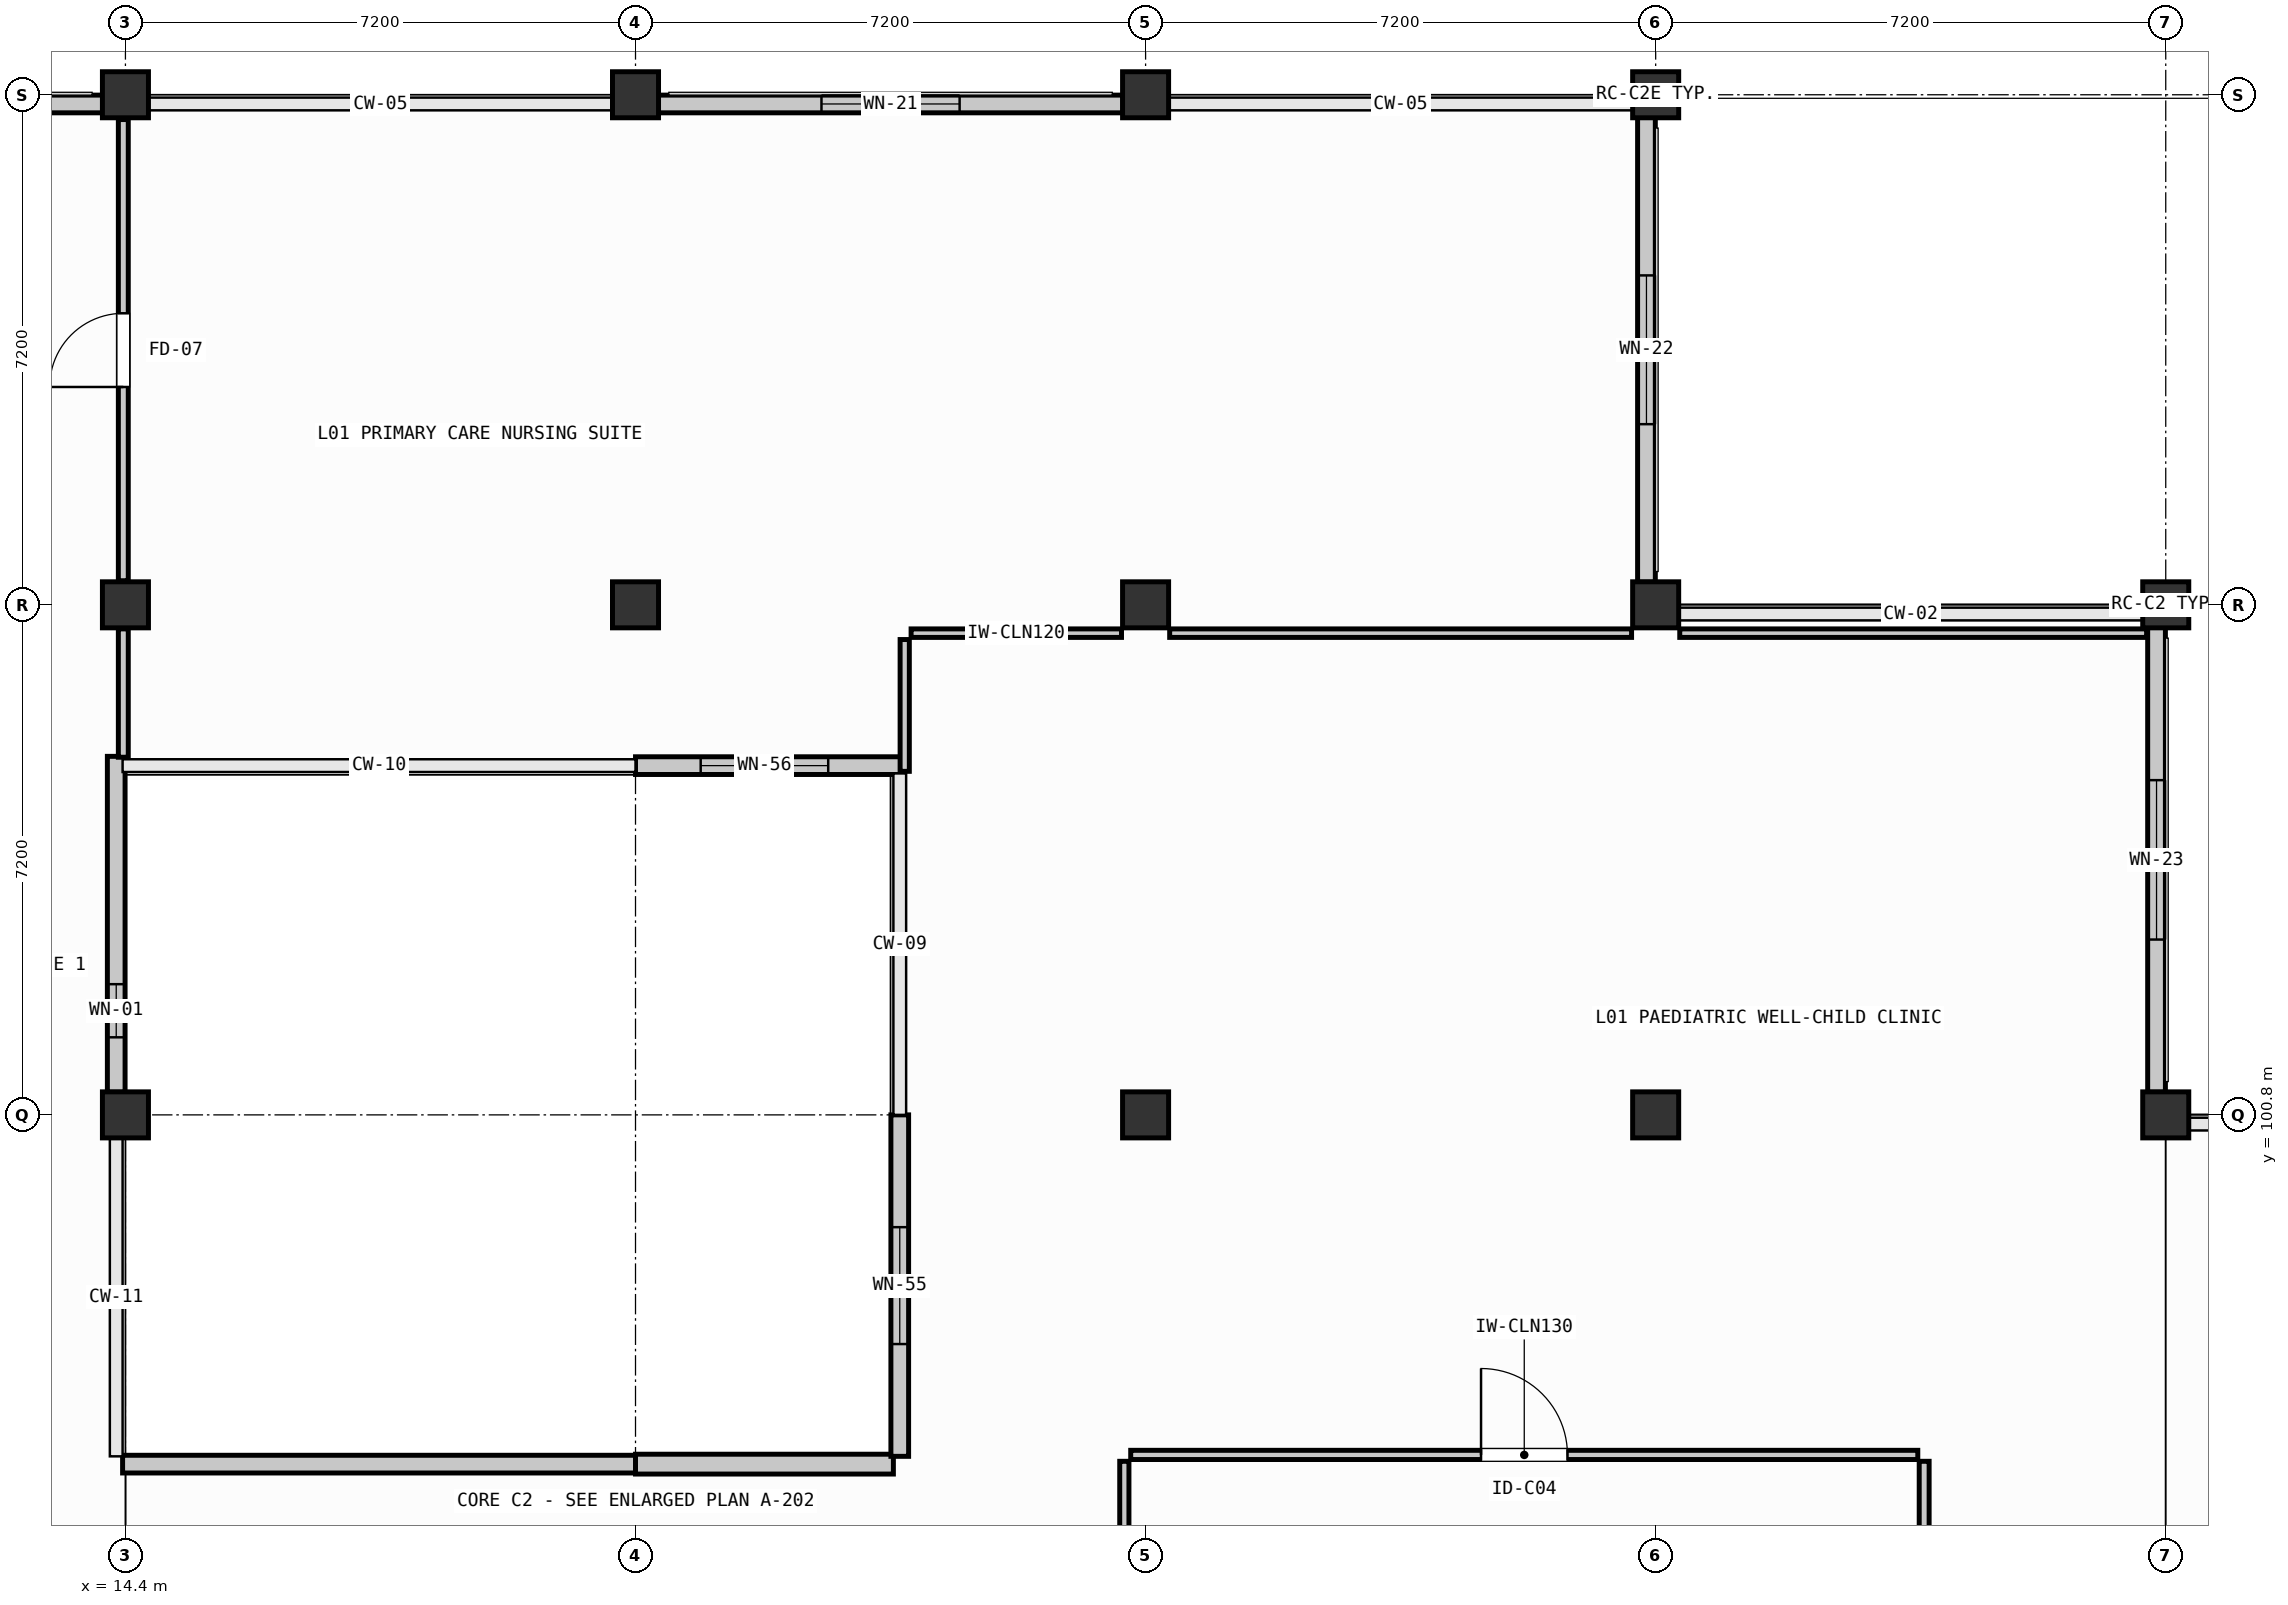
"""IFC4 building model, lengths in metres.
Left out: names, types, materials, properties, quantities, classifications, styles, units other than length and angle.
Written with IfcOpenShell. Run it as: python <this file> out.ifc"""

import sys

from ifc_helpers import new_model, si_unit, direction, frame, frame_2d, origin, origin_2d, place, context, subcontext, project, spatial, rectangle, extrude, element, fill, save


model = new_model("IFC4")
c1 = context("Model", 3, precision=1e-05, world=origin(), true_north=direction((0.0, 1.0)))
c2 = subcontext(c1, "Body", "Model", "MODEL_VIEW")
j1 = project(units=[si_unit("LENGTHUNIT", "METRE"), si_unit("PLANEANGLEUNIT", "RADIAN")], contexts=[c1])
p1 = place(None, origin())
s1 = spatial("IfcSite", under=j1, at=p1, CompositionType="ELEMENT")
p2 = place(p1, origin())
s2 = spatial("IfcBuilding", under=s1, at=p2, CompositionType="ELEMENT")
p3 = place(p2, origin())
s3 = spatial("IfcBuildingStorey", under=s2, at=p3, CompositionType="ELEMENT", Elevation=0.0)
for number, where, z_axis, x_axis in (
    (1, (14.4, 100.8, 0.0), (0.0, 0.0, 1.0), (1.0, 0.0, 0.0)),
    (2, (14.4, 108.0, 0.0), (0.0, 0.0, 1.0), (1.0, 0.0, 0.0)),
    (3, (14.4, 115.2, 0.0), (0.0, 0.0, 1.0), (1.0, 0.0, 0.0)),
    (4, (21.6, 108.0, 0.0), (0.0, 0.0, 1.0), (1.0, 0.0, 0.0)),
    (5, (21.6, 115.2, 0.0), (0.0, 0.0, 1.0), (1.0, 0.0, 0.0)),
    (6, (28.8, 100.8, 0.0), (0.0, 0.0, 1.0), (1.0, 0.0, 0.0)),
    (7, (28.8, 108.0, 0.0), (0.0, 0.0, 1.0), (1.0, 0.0, 0.0)),
    (8, (28.8, 115.2, 0.0), (0.0, 0.0, 1.0), (1.0, 0.0, 0.0)),
):
    element("IfcColumn", number, at=place(p3, frame(where, z_axis=z_axis, x_axis=x_axis)), inside=s3, PredefinedType="COLUMN", context=c2, shape_type="SweptSolid", body=[
        extrude(rectangle(XDim=0.65, YDim=0.65, at=origin_2d()), origin(), (0.0, 0.0, 1.0), 4.56),
    ])
for number, where, z_axis, x_axis in (
    (9, (36.0, 100.8, -0.25), (0.0, 0.0, 1.0), (1.0, 0.0, 0.0)),
    (10, (36.0, 108.0, -0.25), (0.0, 0.0, 1.0), (1.0, 0.0, 0.0)),
    (11, (36.0, 115.2, -0.25), (0.0, 0.0, 1.0), (1.0, 0.0, 0.0)),
    (12, (43.2, 100.8, -0.25), (0.0, 0.0, 1.0), (1.0, 0.0, 0.0)),
    (13, (43.2, 108.0, -0.25), (0.0, 0.0, 1.0), (1.0, 0.0, 0.0)),
):
    element("IfcColumn", number, at=place(p3, frame(where, z_axis=z_axis, x_axis=x_axis)), inside=s3, PredefinedType="COLUMN", context=c2, shape_type="SweptSolid", body=[
        extrude(rectangle(XDim=0.65, YDim=0.65, at=origin_2d()), origin(), (0.0, 0.0, 1.0), 4.81),
    ])
p4 = place(p3, frame((7.52, 115.07, 0.0), z_axis=(0.0, 0.0, 1.0), x_axis=(1.0, 0.0, 0.0)))
e14 = element("IfcWall", 14, at=p4, inside=s3, PredefinedType="SOLIDWALL", context=c2, shape_type="SweptSolid", body=[
    extrude(rectangle(XDim=6.56, YDim=0.25, at=frame_2d((3.28, 0.0))), origin(), (0.0, 0.0, 1.0), 3.86),
])
p5 = place(p4, frame((2.38, 0.0, 1.5)))
e15 = element("IfcOpeningElement", 15, at=p5, cuts=e14, PredefinedType="OPENING", context=c2, shape_type="SweptSolid", body=[
    extrude(rectangle(XDim=1.8, YDim=0.95, at=frame_2d((0.9, 0.475))), frame((0.0, 0.135, 0.0), z_axis=(0.0, -1.0, 0.0), x_axis=(1.0, 0.0, 0.0)), (0.0, 0.0, 1.0), 0.27),
])
p6 = place(p3, frame((21.92, 115.07, 0.0), z_axis=(0.0, 0.0, 1.0), x_axis=(1.0, 0.0, 0.0)))
e16 = element("IfcWall", 16, at=p6, inside=s3, PredefinedType="SOLIDWALL", context=c2, shape_type="SweptSolid", body=[
    extrude(rectangle(XDim=6.56, YDim=0.25, at=frame_2d((3.28, 0.0))), origin(), (0.0, 0.0, 1.0), 3.86),
])
p7 = place(p6, frame((2.305, 0.0, 1.5)))
e17 = element("IfcOpeningElement", 17, at=p7, cuts=e16, PredefinedType="OPENING", context=c2, shape_type="SweptSolid", body=[
    extrude(rectangle(XDim=1.95, YDim=0.95, at=frame_2d((0.975, 0.475))), frame((0.0, 0.135, 0.0), z_axis=(0.0, -1.0, 0.0), x_axis=(1.0, 0.0, 0.0)), (0.0, 0.0, 1.0), 0.27),
])
p8 = place(p3, frame((35.87, 114.88, 0.0), z_axis=(0.0, 0.0, 1.0), x_axis=(0.0, -1.0, 0.0)))
e18 = element("IfcWall", 18, at=p8, inside=s3, PredefinedType="SOLIDWALL", context=c2, shape_type="SweptSolid", body=[
    extrude(rectangle(XDim=6.56, YDim=0.25, at=frame_2d((3.28, 0.0))), origin(), (0.0, 0.0, 1.0), 3.76),
])
p9 = place(p8, frame((2.23, 0.0, 1.5)))
e19 = element("IfcOpeningElement", 19, at=p9, cuts=e18, PredefinedType="OPENING", context=c2, shape_type="SweptSolid", body=[
    extrude(rectangle(XDim=2.1, YDim=0.95, at=frame_2d((1.05, 0.475))), frame((0.0, 0.135, 0.0), z_axis=(0.0, -1.0, 0.0), x_axis=(1.0, 0.0, 0.0)), (0.0, 0.0, 1.0), 0.27),
])
p10 = place(p3, frame((43.07, 107.68, 0.0), z_axis=(0.0, 0.0, 1.0), x_axis=(0.0, -1.0, 0.0)))
e20 = element("IfcWall", 20, at=p10, inside=s3, PredefinedType="SOLIDWALL", context=c2, shape_type="SweptSolid", body=[
    extrude(rectangle(XDim=6.56, YDim=0.25, at=frame_2d((3.28, 0.0))), origin(), (0.0, 0.0, 1.0), 3.76),
])
p11 = place(p10, frame((2.155, 0.0, 1.5)))
e21 = element("IfcOpeningElement", 21, at=p11, cuts=e20, PredefinedType="OPENING", context=c2, shape_type="SweptSolid", body=[
    extrude(rectangle(XDim=2.25, YDim=0.95, at=frame_2d((1.125, 0.475))), frame((0.0, 0.135, 0.0), z_axis=(0.0, -1.0, 0.0), x_axis=(1.0, 0.0, 0.0)), (0.0, 0.0, 1.0), 0.27),
])
p12 = place(p3, frame((14.36, 95.87, 0.0), z_axis=(0.0, 0.0, 1.0), x_axis=(1.0, 0.0, 0.0)))
e22 = element("IfcWall", 22, at=p12, inside=s3, PredefinedType="SOLIDWALL", context=c2, shape_type="SweptSolid", body=[
    extrude(rectangle(XDim=7.24, YDim=0.25, at=frame_2d((3.62, 0.0))), origin(), (0.0, 0.0, 1.0), 3.86),
])
p13 = place(p3, frame((21.6, 95.87, 0.0), z_axis=(0.0, 0.0, 1.0), x_axis=(1.0, 0.0, 0.0)))
e23 = element("IfcWall", 23, at=p13, inside=s3, PredefinedType="SOLIDWALL", context=c2, shape_type="SweptSolid", body=[
    extrude(rectangle(XDim=3.64, YDim=0.28, at=frame_2d((1.82, 0.0))), origin(), (0.0, 0.0, 1.0), 4.57),
])
p14 = place(p3, frame((25.33, 95.98, 0.0), z_axis=(0.0, 0.0, 1.0), x_axis=(0.0, 1.0, 0.0)))
e24 = element("IfcWall", 24, at=p14, inside=s3, PredefinedType="SOLIDWALL", context=c2, shape_type="SweptSolid", body=[
    extrude(rectangle(XDim=4.82, YDim=0.25, at=frame_2d((2.41, 0.0))), origin(), (0.0, 0.0, 1.0), 4.57),
])
p15 = place(p14, frame((1.585, 0.0, 0.95)))
e25 = element("IfcOpeningElement", 25, at=p15, cuts=e24, PredefinedType="OPENING", context=c2, shape_type="SweptSolid", body=[
    extrude(rectangle(XDim=1.65, YDim=1.85, at=frame_2d((0.825, 0.925))), frame((0.0, 0.135, 0.0), z_axis=(0.0, -1.0, 0.0), x_axis=(1.0, 0.0, 0.0)), (0.0, 0.0, 1.0), 0.27),
])
p16 = place(p3, frame((25.351, 105.73, 0.0), z_axis=(0.0, 0.0, 1.0), x_axis=(-1.0, 0.0, 0.0)))
e26 = element("IfcWall", 26, at=p16, inside=s3, PredefinedType="SOLIDWALL", context=c2, shape_type="SweptSolid", body=[
    extrude(rectangle(XDim=3.751, YDim=0.25, at=frame_2d((1.875, 0.0))), origin(), (0.0, 0.0, 1.0), 4.57),
])
p17 = place(p16, frame((1.031, 0.0, 0.95)))
e27 = element("IfcOpeningElement", 27, at=p17, cuts=e26, PredefinedType="OPENING", context=c2, shape_type="SweptSolid", body=[
    extrude(rectangle(XDim=1.8, YDim=1.85, at=frame_2d((0.9, 0.925))), frame((0.0, 0.135, 0.0), z_axis=(0.0, -1.0, 0.0), x_axis=(1.0, 0.0, 0.0)), (0.0, 0.0, 1.0), 0.27),
])
p18 = place(p3, frame((14.27, 105.861, 0.0), z_axis=(0.0, 0.0, 1.0), x_axis=(0.0, -1.0, 0.0)))
e28 = element("IfcWall", 28, at=p18, inside=s3, PredefinedType="SOLIDWALL", context=c2, shape_type="SweptSolid", body=[
    extrude(rectangle(XDim=4.741, YDim=0.25, at=frame_2d((2.371, 0.0))), origin(), (0.0, 0.0, 1.0), 3.76),
])
p19 = place(p18, frame((3.216, 0.0, 2.1)))
e29 = element("IfcOpeningElement", 29, at=p19, cuts=e28, PredefinedType="OPENING", context=c2, shape_type="SweptSolid", body=[
    extrude(rectangle(XDim=0.75, YDim=0.65, at=frame_2d((0.375, 0.325))), frame((0.0, 0.135, 0.0), z_axis=(0.0, -1.0, 0.0), x_axis=(1.0, 0.0, 0.0)), (0.0, 0.0, 1.0), 0.27),
])
p20 = place(p3, frame((28.59, 96.0, 0.0), z_axis=(0.0, 0.0, 1.0), x_axis=(1.0, 0.0, 0.0)))
e30 = element("IfcWall", 30, at=p20, inside=s3, PredefinedType="PARTITIONING", context=c2, shape_type="SweptSolid", body=[
    extrude(rectangle(XDim=11.11, YDim=0.13, at=frame_2d((5.555, 0.0))), origin(), (0.0, 0.0, 1.0), 3.86),
])
p21 = place(p20, frame((4.945, 0.0, 0.0)))
e31 = element("IfcOpeningElement", 31, at=p21, cuts=e30, PredefinedType="OPENING", context=c2, shape_type="SweptSolid", body=[
    extrude(rectangle(XDim=1.22, YDim=2.18, at=frame_2d((0.61, 1.09))), frame((0.0, 0.075, 0.0), z_axis=(0.0, -1.0, 0.0), x_axis=(1.0, 0.0, 0.0)), (0.0, 0.0, 1.0), 0.15),
])
p22 = place(p3, frame((39.79, 95.91, 0.0), z_axis=(0.0, 0.0, 1.0), x_axis=(0.0, -1.0, 0.0)))
e32 = element("IfcWall", 32, at=p22, inside=s3, PredefinedType="PARTITIONING", context=c2, shape_type="SweptSolid", body=[
    extrude(rectangle(XDim=9.28, YDim=0.14, at=frame_2d((4.64, 0.0))), origin(), (0.0, 0.0, 1.0), 3.76),
])
p23 = place(p22, frame((4.08, 0.0, 0.0)))
e33 = element("IfcOpeningElement", 33, at=p23, cuts=e32, PredefinedType="OPENING", context=c2, shape_type="SweptSolid", body=[
    extrude(rectangle(XDim=1.12, YDim=2.14, at=frame_2d((0.56, 1.07))), frame((0.0, 0.08, 0.0), z_axis=(0.0, -1.0, 0.0), x_axis=(1.0, 0.0, 0.0)), (0.0, 0.0, 1.0), 0.16),
])
p24 = place(p3, frame((28.5, 93.94, 0.0), z_axis=(0.0, 0.0, 1.0), x_axis=(0.0, 1.0, 0.0)))
e34 = element("IfcWall", 34, at=p24, inside=s3, PredefinedType="PARTITIONING", context=c2, shape_type="SweptSolid", body=[
    extrude(rectangle(XDim=1.97, YDim=0.13, at=frame_2d((0.985, 0.0))), origin(), (0.0, 0.0, 1.0), 3.86),
])
p25 = place(p3, frame((25.4, 105.649, 0.0), z_axis=(0.0, 0.0, 1.0), x_axis=(0.0, 1.0, 0.0)))
e35 = element("IfcWall", 35, at=p25, inside=s3, PredefinedType="PARTITIONING", context=c2, shape_type="SweptSolid", body=[
    extrude(rectangle(XDim=1.861, YDim=0.13, at=frame_2d((0.93, 0.0))), origin(), (0.0, 0.0, 1.0), 4.57),
])
p26 = place(p3, frame((25.49, 107.6, 0.0), z_axis=(0.0, 0.0, 1.0), x_axis=(1.0, 0.0, 0.0)))
e36 = element("IfcWall", 36, at=p26, inside=s3, PredefinedType="PARTITIONING", context=c2, shape_type="SweptSolid", body=[
    extrude(rectangle(XDim=2.97, YDim=0.12, at=frame_2d((1.485, 0.0))), origin(), (0.0, 0.0, 1.0), 3.76),
])
p27 = place(p3, frame((29.14, 107.6, 0.0), z_axis=(0.0, 0.0, 1.0), x_axis=(1.0, 0.0, 0.0)))
e37 = element("IfcWall", 37, at=p27, inside=s3, PredefinedType="PARTITIONING", context=c2, shape_type="SweptSolid", body=[
    extrude(rectangle(XDim=6.52, YDim=0.12, at=frame_2d((3.26, 0.0))), origin(), (0.0, 0.0, 1.0), 3.76),
])
p28 = place(p3, frame((36.34, 107.6, 0.0), z_axis=(0.0, 0.0, 1.0), x_axis=(1.0, 0.0, 0.0)))
e38 = element("IfcWall", 38, at=p28, inside=s3, PredefinedType="PARTITIONING", context=c2, shape_type="SweptSolid", body=[
    extrude(rectangle(XDim=6.59, YDim=0.12, at=frame_2d((3.295, 0.0))), origin(), (0.0, 0.0, 1.0), 3.76),
])
p29 = place(p3, frame((14.37, 105.848, 0.0), z_axis=(0.0, 0.0, 1.0), x_axis=(0.0, 1.0, 0.0)))
e39 = element("IfcWall", 39, at=p29, inside=s3, PredefinedType="PARTITIONING", context=c2, shape_type="SweptSolid", body=[
    extrude(rectangle(XDim=1.812, YDim=0.14, at=frame_2d((0.906, 0.0))), origin(), (0.0, 0.0, 1.0), 3.76),
])
p30 = place(p3, frame((14.37, 108.34, 0.0), z_axis=(0.0, 0.0, 1.0), x_axis=(0.0, 1.0, 0.0)))
e40 = element("IfcWall", 40, at=p30, inside=s3, PredefinedType="PARTITIONING", context=c2, shape_type="SweptSolid", body=[
    extrude(rectangle(XDim=6.51, YDim=0.14, at=frame_2d((3.255, 0.0))), origin(), (0.0, 0.0, 1.0), 3.76),
])
p31 = place(p30, frame((2.735, 0.0, 0.0)))
e41 = element("IfcOpeningElement", 41, at=p31, cuts=e40, PredefinedType="OPENING", context=c2, shape_type="SweptSolid", body=[
    extrude(rectangle(XDim=1.04, YDim=2.12, at=frame_2d((0.52, 1.06))), frame((0.0, 0.08, 0.0), z_axis=(0.0, -1.0, 0.0), x_axis=(1.0, 0.0, 0.0)), (0.0, 0.0, 1.0), 0.16),
])
p32 = place(p7, origin())
e42 = element("IfcWindow", 42, at=p32, inside=s3, PartitioningType="SINGLE_PANEL", PredefinedType="WINDOW", context=c2, shape_type="SweptSolid", body=[
    extrude(rectangle(XDim=1.95, YDim=0.95, at=frame_2d((0.975, 0.475))), frame((0.0, 0.03, 0.0), z_axis=(0.0, -1.0, 0.0), x_axis=(1.0, 0.0, 0.0)), (0.0, 0.0, 1.0), 0.06),
])
fill(e17, e42)
p33 = place(p9, origin())
e43 = element("IfcWindow", 43, at=p33, inside=s3, PartitioningType="SINGLE_PANEL", PredefinedType="WINDOW", context=c2, shape_type="SweptSolid", body=[
    extrude(rectangle(XDim=2.1, YDim=0.95, at=frame_2d((1.05, 0.475))), frame((0.0, 0.03, 0.0), z_axis=(0.0, -1.0, 0.0), x_axis=(1.0, 0.0, 0.0)), (0.0, 0.0, 1.0), 0.06),
])
fill(e19, e43)
p34 = place(p11, origin())
e44 = element("IfcWindow", 44, at=p34, inside=s3, PartitioningType="SINGLE_PANEL", PredefinedType="WINDOW", context=c2, shape_type="SweptSolid", body=[
    extrude(rectangle(XDim=2.25, YDim=0.95, at=frame_2d((1.125, 0.475))), frame((0.0, 0.03, 0.0), z_axis=(0.0, -1.0, 0.0), x_axis=(1.0, 0.0, 0.0)), (0.0, 0.0, 1.0), 0.06),
])
fill(e21, e44)
p35 = place(p15, origin())
e45 = element("IfcWindow", 45, at=p35, inside=s3, PartitioningType="SINGLE_PANEL", PredefinedType="WINDOW", context=c2, shape_type="SweptSolid", body=[
    extrude(rectangle(XDim=1.65, YDim=1.85, at=frame_2d((0.825, 0.925))), frame((0.0, 0.03, 0.0), z_axis=(0.0, -1.0, 0.0), x_axis=(1.0, 0.0, 0.0)), (0.0, 0.0, 1.0), 0.06),
])
fill(e25, e45)
p36 = place(p17, origin())
e46 = element("IfcWindow", 46, at=p36, inside=s3, PartitioningType="SINGLE_PANEL", PredefinedType="WINDOW", context=c2, shape_type="SweptSolid", body=[
    extrude(rectangle(XDim=1.8, YDim=1.85, at=frame_2d((0.9, 0.925))), frame((0.0, 0.03, 0.0), z_axis=(0.0, -1.0, 0.0), x_axis=(1.0, 0.0, 0.0)), (0.0, 0.0, 1.0), 0.06),
])
fill(e27, e46)
p37 = place(p19, origin())
e47 = element("IfcWindow", 47, at=p37, inside=s3, PartitioningType="SINGLE_PANEL", PredefinedType="WINDOW", context=c2, shape_type="SweptSolid", body=[
    extrude(rectangle(XDim=0.75, YDim=0.65, at=frame_2d((0.375, 0.325))), frame((0.0, 0.03, 0.0), z_axis=(0.0, -1.0, 0.0), x_axis=(1.0, 0.0, 0.0)), (0.0, 0.0, 1.0), 0.06),
])
fill(e29, e47)
p38 = place(p21, origin())
e48 = element("IfcDoor", 48, at=p38, inside=s3, OperationType="SINGLE_SWING_LEFT", PredefinedType="DOOR", context=c2, shape_type="SweptSolid", body=[
    extrude(rectangle(XDim=1.22, YDim=2.18, at=frame_2d((0.61, 1.09))), frame((0.0, 0.025, 0.0), z_axis=(0.0, -1.0, 0.0), x_axis=(1.0, 0.0, 0.0)), (0.0, 0.0, 1.0), 0.05),
])
fill(e31, e48)
p39 = place(p31, origin())
e49 = element("IfcDoor", 49, at=p39, inside=s3, OperationType="SINGLE_SWING_RIGHT", PredefinedType="DOOR", context=c2, shape_type="SweptSolid", body=[
    extrude(rectangle(XDim=1.04, YDim=2.12, at=frame_2d((0.52, 1.06))), frame((0.0, 0.025, 0.0), z_axis=(0.0, -1.0, 0.0), x_axis=(1.0, 0.0, 0.0)), (0.0, 0.0, 1.0), 0.05),
])
fill(e41, e49)
save(model, sys.argv[1])
